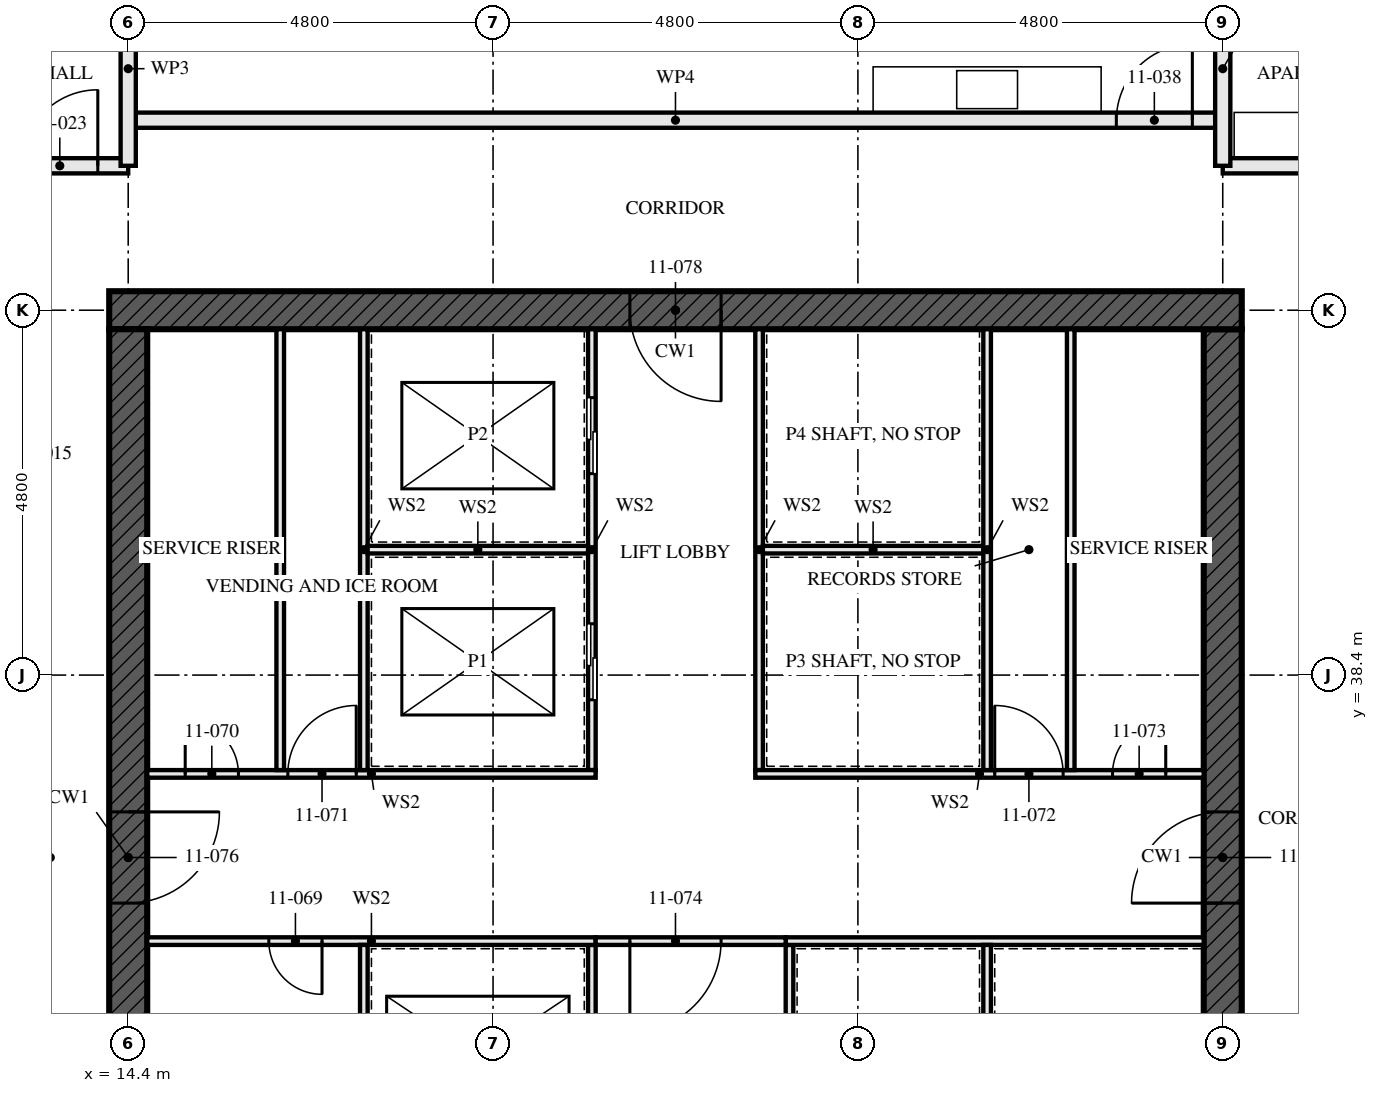
"""IFC4 building model, lengths in metres.
Left out: names, types, materials, properties, quantities, classifications, styles, units other than length and angle.
Written with IfcOpenShell. Run it as: python <this file> out.ifc"""

import sys

from ifc_helpers import new_model, si_unit, direction, frame, frame_2d, origin, place, context, subcontext, project, spatial, rectangle, extrude, element, fill, save


model = new_model("IFC4")
c1 = context("Model", 3, precision=1e-05, world=origin(), true_north=direction((0.0, 1.0)))
c2 = subcontext(c1, "Body", "Model", "MODEL_VIEW")
j1 = project(units=[si_unit("LENGTHUNIT", "METRE"), si_unit("PLANEANGLEUNIT", "RADIAN")], contexts=[c1])
p1 = place(None, origin())
s1 = spatial("IfcSite", under=j1, at=p1, CompositionType="ELEMENT")
p2 = place(p1, origin())
s2 = spatial("IfcBuilding", under=s1, at=p2, CompositionType="ELEMENT")
p3 = place(p2, frame((0.0, 0.0, 44.5)))
s3 = spatial("IfcBuildingStorey", under=s2, at=p3, CompositionType="ELEMENT", Elevation=44.5)
p4 = place(p3, frame((29.05, 43.2, -0.17), z_axis=(0.0, 0.0, 1.0), x_axis=(-1.0, 0.0, 0.0)))
e1 = element("IfcWall", 1, at=p4, inside=s3, PredefinedType="SHEAR", context=c2, shape_type="SweptSolid", body=[
    extrude(rectangle(XDim=14.9, YDim=0.5, at=frame_2d((7.45, 0.0))), origin(), (0.0, 0.0, 1.0), 3.5),
])
p5 = place(p4, frame((6.85, 0.0, 0.17)))
e2 = element("IfcOpeningElement", 2, at=p5, cuts=e1, PredefinedType="OPENING", context=c2, shape_type="SweptSolid", body=[
    extrude(rectangle(XDim=1.2, YDim=2.1, at=frame_2d((0.6, 1.05))), frame((0.0, 0.26, 0.0), z_axis=(0.0, -1.0, 0.0), x_axis=(1.0, 0.0, 0.0)), (0.0, 0.0, 1.0), 0.521),
])
p6 = place(p3, frame((14.4, 42.95, -0.17), z_axis=(0.0, 0.0, 1.0), x_axis=(0.0, -1.0, 0.0)))
e3 = element("IfcWall", 3, at=p6, inside=s3, PredefinedType="SHEAR", context=c2, shape_type="SweptSolid", body=[
    extrude(rectangle(XDim=13.9, YDim=0.5, at=frame_2d((6.95, 0.0))), origin(), (0.0, 0.0, 1.0), 3.5),
])
p7 = place(p6, frame((6.35, 0.0, 0.17)))
e4 = element("IfcOpeningElement", 4, at=p7, cuts=e3, PredefinedType="OPENING", context=c2, shape_type="SweptSolid", body=[
    extrude(rectangle(XDim=1.2, YDim=2.1, at=frame_2d((0.6, 1.05))), frame((0.0, 0.26, 0.0), z_axis=(0.0, -1.0, 0.0), x_axis=(1.0, 0.0, 0.0)), (0.0, 0.0, 1.0), 0.521),
])
p8 = place(p3, frame((28.8, 29.05, -0.17), z_axis=(0.0, 0.0, 1.0), x_axis=(0.0, 1.0, 0.0)))
e5 = element("IfcWall", 5, at=p8, inside=s3, PredefinedType="SHEAR", context=c2, shape_type="SweptSolid", body=[
    extrude(rectangle(XDim=13.9, YDim=0.5, at=frame_2d((6.95, 0.0))), origin(), (0.0, 0.0, 1.0), 3.5),
])
p9 = place(p8, frame((6.35, 0.0, 0.17)))
e6 = element("IfcOpeningElement", 6, at=p9, cuts=e5, PredefinedType="OPENING", context=c2, shape_type="SweptSolid", body=[
    extrude(rectangle(XDim=1.2, YDim=2.1, at=frame_2d((0.6, 1.05))), frame((0.0, 0.26, 0.0), z_axis=(0.0, -1.0, 0.0), x_axis=(1.0, 0.0, 0.0)), (0.0, 0.0, 1.0), 0.521),
])
p10 = place(p3, frame((14.4, 45.1, 0.0), z_axis=(0.0, 0.0, 1.0), x_axis=(-1.0, 0.0, 0.0)))
e7 = element("IfcWall", 7, at=p10, inside=s3, PredefinedType="PARTITIONING", context=c2, shape_type="SweptSolid", body=[
    extrude(rectangle(XDim=9.6, YDim=0.2, at=frame_2d((4.8, 0.0))), origin(), (0.0, 0.0, 1.0), 3.33),
])
p11 = place(p10, frame((0.4, 0.0, 0.0)))
e8 = element("IfcOpeningElement", 8, at=p11, cuts=e7, PredefinedType="OPENING", context=c2, shape_type="SweptSolid", body=[
    extrude(rectangle(XDim=1.0, YDim=2.1, at=frame_2d((0.5, 1.05))), frame((0.0, 0.111, 0.0), z_axis=(0.0, -1.0, 0.0), x_axis=(1.0, 0.0, 0.0)), (0.0, 0.0, 1.0), 0.221),
])
p12 = place(p3, frame((28.8, 45.7, 0.0), z_axis=(0.0, 0.0, 1.0), x_axis=(-1.0, 0.0, 0.0)))
e9 = element("IfcWall", 9, at=p12, inside=s3, PredefinedType="PARTITIONING", context=c2, shape_type="SweptSolid", body=[
    extrude(rectangle(XDim=14.4, YDim=0.2, at=frame_2d((7.2, 0.0))), origin(), (0.0, 0.0, 1.0), 3.33),
])
p13 = place(p12, frame((0.4, 0.0, 0.0)))
e10 = element("IfcOpeningElement", 10, at=p13, cuts=e9, PredefinedType="OPENING", context=c2, shape_type="SweptSolid", body=[
    extrude(rectangle(XDim=1.0, YDim=2.1, at=frame_2d((0.5, 1.05))), frame((0.0, 0.111, 0.0), z_axis=(0.0, -1.0, 0.0), x_axis=(1.0, 0.0, 0.0)), (0.0, 0.0, 1.0), 0.221),
])
p14 = place(p3, frame((38.4, 45.1, 0.0), z_axis=(0.0, 0.0, 1.0), x_axis=(-1.0, 0.0, 0.0)))
e11 = element("IfcWall", 11, at=p14, inside=s3, PredefinedType="PARTITIONING", context=c2, shape_type="SweptSolid", body=[
    extrude(rectangle(XDim=9.6, YDim=0.2, at=frame_2d((4.8, 0.0))), origin(), (0.0, 0.0, 1.0), 3.33),
])
p15 = place(p14, frame((0.4, 0.0, 0.0)))
e12 = element("IfcOpeningElement", 12, at=p15, cuts=e11, PredefinedType="OPENING", context=c2, shape_type="SweptSolid", body=[
    extrude(rectangle(XDim=1.0, YDim=2.1, at=frame_2d((0.5, 1.05))), frame((0.0, 0.111, 0.0), z_axis=(0.0, -1.0, 0.0), x_axis=(1.0, 0.0, 0.0)), (0.0, 0.0, 1.0), 0.221),
])
p16 = place(p14, frame((5.2, 0.0, 0.0)))
e13 = element("IfcOpeningElement", 13, at=p16, cuts=e11, PredefinedType="OPENING", context=c2, shape_type="SweptSolid", body=[
    extrude(rectangle(XDim=1.0, YDim=2.1, at=frame_2d((0.5, 1.05))), frame((0.0, 0.111, 0.0), z_axis=(0.0, -1.0, 0.0), x_axis=(1.0, 0.0, 0.0)), (0.0, 0.0, 1.0), 0.221),
])
for number, where, z_axis, x_axis in (
    (14, (16.4, 37.15, 0.0), (0.0, 0.0, 1.0), (0.0, 1.0, 0.0)),
    (15, (26.8, 37.15, 0.0), (0.0, 0.0, 1.0), (0.0, 1.0, 0.0)),
):
    element("IfcWall", number, at=place(p3, frame(where, z_axis=z_axis, x_axis=x_axis)), inside=s3, PredefinedType="SOLIDWALL", context=c2, shape_type="SweptSolid", body=[
        extrude(rectangle(XDim=5.8, YDim=0.1, at=frame_2d((2.9, 0.0))), origin(), (0.0, 0.0, 1.0), 3.33),
    ])
p17 = place(p3, frame((20.5, 29.05, 0.0), z_axis=(0.0, 0.0, 1.0), x_axis=(0.0, 1.0, 0.0)))
e16 = element("IfcWall", 16, at=p17, inside=s3, PredefinedType="SOLIDWALL", context=c2, shape_type="SweptSolid", body=[
    extrude(rectangle(XDim=5.8, YDim=0.1, at=frame_2d((2.9, 0.0))), origin(), (0.0, 0.0, 1.0), 3.33),
])
p18 = place(p17, frame((0.8, 0.0, 0.0)))
e17 = element("IfcOpeningElement", 17, at=p18, cuts=e16, PredefinedType="OPENING", context=c2, shape_type="SweptSolid", body=[
    extrude(rectangle(XDim=1.1, YDim=2.3, at=frame_2d((0.55, 1.15))), frame((0.0, 0.061, 0.0), z_axis=(0.0, -1.0, 0.0), x_axis=(1.0, 0.0, 0.0)), (0.0, 0.0, 1.0), 0.121),
])
p19 = place(p17, frame((3.775, 0.0, 0.0)))
e18 = element("IfcOpeningElement", 18, at=p19, cuts=e16, PredefinedType="OPENING", context=c2, shape_type="SweptSolid", body=[
    extrude(rectangle(XDim=1.1, YDim=2.3, at=frame_2d((0.55, 1.15))), frame((0.0, 0.061, 0.0), z_axis=(0.0, -1.0, 0.0), x_axis=(1.0, 0.0, 0.0)), (0.0, 0.0, 1.0), 0.121),
])
p20 = place(p3, frame((20.5, 37.15, 0.0), z_axis=(0.0, 0.0, 1.0), x_axis=(0.0, 1.0, 0.0)))
e19 = element("IfcWall", 19, at=p20, inside=s3, PredefinedType="SOLIDWALL", context=c2, shape_type="SweptSolid", body=[
    extrude(rectangle(XDim=5.8, YDim=0.1, at=frame_2d((2.9, 0.0))), origin(), (0.0, 0.0, 1.0), 3.33),
])
p21 = place(p20, frame((0.925, 0.0, 0.0)))
e20 = element("IfcOpeningElement", 20, at=p21, cuts=e19, PredefinedType="OPENING", context=c2, shape_type="SweptSolid", body=[
    extrude(rectangle(XDim=1.0, YDim=2.1, at=frame_2d((0.5, 1.05))), frame((0.0, 0.061, 0.0), z_axis=(0.0, -1.0, 0.0), x_axis=(1.0, 0.0, 0.0)), (0.0, 0.0, 1.0), 0.121),
])
p22 = place(p20, frame((3.9, 0.0, 0.0)))
e21 = element("IfcOpeningElement", 21, at=p22, cuts=e19, PredefinedType="OPENING", context=c2, shape_type="SweptSolid", body=[
    extrude(rectangle(XDim=1.0, YDim=2.1, at=frame_2d((0.5, 1.05))), frame((0.0, 0.061, 0.0), z_axis=(0.0, -1.0, 0.0), x_axis=(1.0, 0.0, 0.0)), (0.0, 0.0, 1.0), 0.121),
])
p23 = place(p3, frame((22.7, 37.15, 0.0), z_axis=(0.0, 0.0, 1.0), x_axis=(0.0, 1.0, 0.0)))
e22 = element("IfcWall", 22, at=p23, inside=s3, PredefinedType="SOLIDWALL", context=c2, shape_type="SweptSolid", body=[
    extrude(rectangle(XDim=5.8, YDim=0.1, at=frame_2d((2.9, 0.0))), origin(), (0.0, 0.0, 1.0), 3.33),
])
p24 = place(p3, frame((23.1, 29.05, 0.0), z_axis=(0.0, 0.0, 1.0), x_axis=(0.0, 1.0, 0.0)))
e23 = element("IfcWall", 23, at=p24, inside=s3, PredefinedType="SOLIDWALL", context=c2, shape_type="SweptSolid", body=[
    extrude(rectangle(XDim=5.8, YDim=0.1, at=frame_2d((2.9, 0.0))), origin(), (0.0, 0.0, 1.0), 3.33),
])
p25 = place(p24, frame((1.0, 0.0, 0.0)))
e24 = element("IfcOpeningElement", 24, at=p25, cuts=e23, PredefinedType="OPENING", context=c2, shape_type="SweptSolid", body=[
    extrude(rectangle(XDim=0.7, YDim=2.1, at=frame_2d((0.35, 1.05))), frame((0.0, 0.061, 0.0), z_axis=(0.0, -1.0, 0.0), x_axis=(1.0, 0.0, 0.0)), (0.0, 0.0, 1.0), 0.121),
])
p26 = place(p3, frame((14.65, 34.9, 0.0), z_axis=(0.0, 0.0, 1.0), x_axis=(1.0, 0.0, 0.0)))
e25 = element("IfcWall", 25, at=p26, inside=s3, PredefinedType="SOLIDWALL", context=c2, shape_type="SweptSolid", body=[
    extrude(rectangle(XDim=5.9, YDim=0.1, at=frame_2d((2.95, 0.0))), origin(), (0.0, 0.0, 1.0), 3.33),
])
p27 = place(p26, frame((1.6, 0.0, 0.0)))
e26 = element("IfcOpeningElement", 26, at=p27, cuts=e25, PredefinedType="OPENING", context=c2, shape_type="SweptSolid", body=[
    extrude(rectangle(XDim=0.7, YDim=2.1, at=frame_2d((0.35, 1.05))), frame((0.0, 0.061, 0.0), z_axis=(0.0, -1.0, 0.0), x_axis=(1.0, 0.0, 0.0)), (0.0, 0.0, 1.0), 0.121),
])
p28 = place(p3, frame((23.05, 34.9, 0.0), z_axis=(0.0, 0.0, 1.0), x_axis=(1.0, 0.0, 0.0)))
e27 = element("IfcWall", 27, at=p28, inside=s3, PredefinedType="SOLIDWALL", context=c2, shape_type="SweptSolid", body=[
    extrude(rectangle(XDim=5.5, YDim=0.1, at=frame_2d((2.75, 0.0))), origin(), (0.0, 0.0, 1.0), 3.33),
])
p29 = place(p3, frame((14.65, 37.1, 0.0), z_axis=(0.0, 0.0, 1.0), x_axis=(1.0, 0.0, 0.0)))
e28 = element("IfcWall", 28, at=p29, inside=s3, PredefinedType="SOLIDWALL", context=c2, shape_type="SweptSolid", body=[
    extrude(rectangle(XDim=5.9, YDim=0.1, at=frame_2d((2.95, 0.0))), origin(), (0.0, 0.0, 1.0), 3.33),
])
p30 = place(p29, frame((0.5, 0.0, 0.0)))
e29 = element("IfcOpeningElement", 29, at=p30, cuts=e28, PredefinedType="OPENING", context=c2, shape_type="SweptSolid", body=[
    extrude(rectangle(XDim=0.7, YDim=2.1, at=frame_2d((0.35, 1.05))), frame((0.0, 0.061, 0.0), z_axis=(0.0, -1.0, 0.0), x_axis=(1.0, 0.0, 0.0)), (0.0, 0.0, 1.0), 0.121),
])
p31 = place(p29, frame((1.85, 0.0, 0.0)))
e30 = element("IfcOpeningElement", 30, at=p31, cuts=e28, PredefinedType="OPENING", context=c2, shape_type="SweptSolid", body=[
    extrude(rectangle(XDim=0.9, YDim=2.1, at=frame_2d((0.45, 1.05))), frame((0.0, 0.061, 0.0), z_axis=(0.0, -1.0, 0.0), x_axis=(1.0, 0.0, 0.0)), (0.0, 0.0, 1.0), 0.121),
])
p32 = place(p3, frame((22.65, 37.1, 0.0), z_axis=(0.0, 0.0, 1.0), x_axis=(1.0, 0.0, 0.0)))
e31 = element("IfcWall", 31, at=p32, inside=s3, PredefinedType="SOLIDWALL", context=c2, shape_type="SweptSolid", body=[
    extrude(rectangle(XDim=5.9, YDim=0.1, at=frame_2d((2.95, 0.0))), origin(), (0.0, 0.0, 1.0), 3.33),
])
p33 = place(p32, frame((3.15, 0.0, 0.0)))
e32 = element("IfcOpeningElement", 32, at=p33, cuts=e31, PredefinedType="OPENING", context=c2, shape_type="SweptSolid", body=[
    extrude(rectangle(XDim=0.9, YDim=2.1, at=frame_2d((0.45, 1.05))), frame((0.0, 0.061, 0.0), z_axis=(0.0, -1.0, 0.0), x_axis=(1.0, 0.0, 0.0)), (0.0, 0.0, 1.0), 0.121),
])
p34 = place(p32, frame((4.7, 0.0, 0.0)))
e33 = element("IfcOpeningElement", 33, at=p34, cuts=e31, PredefinedType="OPENING", context=c2, shape_type="SweptSolid", body=[
    extrude(rectangle(XDim=0.7, YDim=2.1, at=frame_2d((0.35, 1.05))), frame((0.0, 0.061, 0.0), z_axis=(0.0, -1.0, 0.0), x_axis=(1.0, 0.0, 0.0)), (0.0, 0.0, 1.0), 0.121),
])
p35 = place(p3, frame((20.55, 34.9, 0.0), z_axis=(0.0, 0.0, 1.0), x_axis=(1.0, 0.0, 0.0)))
e34 = element("IfcWall", 34, at=p35, inside=s3, PredefinedType="SOLIDWALL", context=c2, shape_type="SweptSolid", body=[
    extrude(rectangle(XDim=2.5, YDim=0.1, at=frame_2d((1.25, 0.0))), origin(), (0.0, 0.0, 1.0), 3.33),
])
p36 = place(p35, frame((0.45, 0.0, 0.0)))
e35 = element("IfcOpeningElement", 35, at=p36, cuts=e34, PredefinedType="OPENING", context=c2, shape_type="SweptSolid", body=[
    extrude(rectangle(XDim=1.2, YDim=2.1, at=frame_2d((0.6, 1.05))), frame((0.0, 0.061, 0.0), z_axis=(0.0, -1.0, 0.0), x_axis=(1.0, 0.0, 0.0)), (0.0, 0.0, 1.0), 0.121),
])
for number, where, z_axis, x_axis in (
    (36, (17.5, 29.05, 0.0), (0.0, 0.0, 1.0), (0.0, 1.0, 0.0)),
    (37, (17.5, 37.15, 0.0), (0.0, 0.0, 1.0), (0.0, 1.0, 0.0)),
):
    element("IfcWall", number, at=place(p3, frame(where, z_axis=z_axis, x_axis=x_axis)), inside=s3, PredefinedType="SOLIDWALL", context=c2, shape_type="SweptSolid", body=[
        extrude(rectangle(XDim=5.8, YDim=0.1, at=frame_2d((2.9, 0.0))), origin(), (0.0, 0.0, 1.0), 3.33),
    ])
for number, where, z_axis, x_axis in (
    (38, (17.55, 40.05, 0.0), (0.0, 0.0, 1.0), (1.0, 0.0, 0.0)),
    (39, (22.75, 40.05, 0.0), (0.0, 0.0, 1.0), (1.0, 0.0, 0.0)),
):
    element("IfcWall", number, at=place(p3, frame(where, z_axis=z_axis, x_axis=x_axis)), inside=s3, PredefinedType="SOLIDWALL", context=c2, shape_type="SweptSolid", body=[
        extrude(rectangle(XDim=2.9, YDim=0.1, at=frame_2d((1.45, 0.0))), origin(), (0.0, 0.0, 1.0), 3.33),
    ])
p37 = place(p3, frame((25.7, 37.15, 0.0), z_axis=(0.0, 0.0, 1.0), x_axis=(0.0, 1.0, 0.0)))
e40 = element("IfcWall", 40, at=p37, inside=s3, PredefinedType="SOLIDWALL", context=c2, shape_type="SweptSolid", body=[
    extrude(rectangle(XDim=5.8, YDim=0.1, at=frame_2d((2.9, 0.0))), origin(), (0.0, 0.0, 1.0), 3.33),
])
p38 = place(p3, frame((25.7, 31.95, 0.0), z_axis=(0.0, 0.0, 1.0), x_axis=(0.0, 1.0, 0.0)))
e41 = element("IfcWall", 41, at=p38, inside=s3, PredefinedType="SOLIDWALL", context=c2, shape_type="SweptSolid", body=[
    extrude(rectangle(XDim=2.9, YDim=0.1, at=frame_2d((1.45, 0.0))), origin(), (0.0, 0.0, 1.0), 3.33),
])
for number, where, z_axis, x_axis in (
    (42, (14.4, 45.1, 0.0), (0.0, 0.0, 1.0), (0.0, 1.0, 0.0)),
    (43, (28.8, 45.1, 0.0), (0.0, 0.0, 1.0), (0.0, 1.0, 0.0)),
):
    element("IfcWall", number, at=place(p3, frame(where, z_axis=z_axis, x_axis=x_axis)), inside=s3, PredefinedType="PARTITIONING", context=c2, shape_type="SweptSolid", body=[
        extrude(rectangle(XDim=2.555, YDim=0.2, at=frame_2d((1.277, 0.0))), origin(), (0.0, 0.0, 1.0), 2.32),
    ])
p39 = place(p11, frame((1.0, 0.0, 0.0), z_axis=(0.0, 0.0, 1.0), x_axis=(-1.0, 0.0, 0.0)))
e44 = element("IfcDoor", 44, at=p39, inside=s3, OperationType="SINGLE_SWING_LEFT", PredefinedType="DOOR", context=c2, shape_type="SweptSolid", body=[
    extrude(rectangle(XDim=1.0, YDim=2.1, at=frame_2d((0.5, 1.05))), frame((0.0, 0.027, 0.0), z_axis=(0.0, -1.0, 0.0), x_axis=(1.0, 0.0, 0.0)), (0.0, 0.0, 1.0), 0.054),
])
fill(e8, e44)
p40 = place(p13, frame((1.0, 0.0, 0.0), z_axis=(0.0, 0.0, 1.0), x_axis=(-1.0, 0.0, 0.0)))
e45 = element("IfcDoor", 45, at=p40, inside=s3, OperationType="SINGLE_SWING_LEFT", PredefinedType="DOOR", context=c2, shape_type="SweptSolid", body=[
    extrude(rectangle(XDim=1.0, YDim=2.1, at=frame_2d((0.5, 1.05))), frame((0.0, 0.027, 0.0), z_axis=(0.0, -1.0, 0.0), x_axis=(1.0, 0.0, 0.0)), (0.0, 0.0, 1.0), 0.054),
])
fill(e10, e45)
p41 = place(p21, origin())
e46 = element("IfcDoor", 46, at=p41, inside=s3, OperationType="SLIDING_TO_LEFT", PredefinedType="DOOR", context=c2, shape_type="SweptSolid", body=[
    extrude(rectangle(XDim=1.0, YDim=2.1, at=frame_2d((0.5, 1.05))), frame((0.0, 0.05, 0.0), z_axis=(0.0, -1.0, 0.0), x_axis=(1.0, 0.0, 0.0)), (0.0, 0.0, 1.0), 0.1),
])
fill(e20, e46)
p42 = place(p22, origin())
e47 = element("IfcDoor", 47, at=p42, inside=s3, OperationType="SLIDING_TO_LEFT", PredefinedType="DOOR", context=c2, shape_type="SweptSolid", body=[
    extrude(rectangle(XDim=1.0, YDim=2.1, at=frame_2d((0.5, 1.05))), frame((0.0, 0.05, 0.0), z_axis=(0.0, -1.0, 0.0), x_axis=(1.0, 0.0, 0.0)), (0.0, 0.0, 1.0), 0.1),
])
fill(e21, e47)
p43 = place(p27, frame((0.7, 0.0, 0.0), z_axis=(0.0, 0.0, 1.0), x_axis=(-1.0, 0.0, 0.0)))
e48 = element("IfcDoor", 48, at=p43, inside=s3, OperationType="SINGLE_SWING_RIGHT", PredefinedType="DOOR", context=c2, shape_type="SweptSolid", body=[
    extrude(rectangle(XDim=0.7, YDim=2.1, at=frame_2d((0.35, 1.05))), frame((0.0, 0.027, 0.0), z_axis=(0.0, -1.0, 0.0), x_axis=(1.0, 0.0, 0.0)), (0.0, 0.0, 1.0), 0.054),
])
fill(e26, e48)
p44 = place(p30, origin())
e49 = element("IfcDoor", 49, at=p44, inside=s3, OperationType="SINGLE_SWING_RIGHT", PredefinedType="DOOR", context=c2, shape_type="SweptSolid", body=[
    extrude(rectangle(XDim=0.7, YDim=2.1, at=frame_2d((0.35, 1.05))), frame((0.0, 0.027, 0.0), z_axis=(0.0, -1.0, 0.0), x_axis=(1.0, 0.0, 0.0)), (0.0, 0.0, 1.0), 0.054),
])
fill(e29, e49)
p45 = place(p31, origin())
e50 = element("IfcDoor", 50, at=p45, inside=s3, OperationType="SINGLE_SWING_LEFT", PredefinedType="DOOR", context=c2, shape_type="SweptSolid", body=[
    extrude(rectangle(XDim=0.9, YDim=2.1, at=frame_2d((0.45, 1.05))), frame((0.0, 0.027, 0.0), z_axis=(0.0, -1.0, 0.0), x_axis=(1.0, 0.0, 0.0)), (0.0, 0.0, 1.0), 0.054),
])
fill(e30, e50)
p46 = place(p33, origin())
e51 = element("IfcDoor", 51, at=p46, inside=s3, OperationType="SINGLE_SWING_RIGHT", PredefinedType="DOOR", context=c2, shape_type="SweptSolid", body=[
    extrude(rectangle(XDim=0.9, YDim=2.1, at=frame_2d((0.45, 1.05))), frame((0.0, 0.027, 0.0), z_axis=(0.0, -1.0, 0.0), x_axis=(1.0, 0.0, 0.0)), (0.0, 0.0, 1.0), 0.054),
])
fill(e32, e51)
p47 = place(p34, origin())
e52 = element("IfcDoor", 52, at=p47, inside=s3, OperationType="SINGLE_SWING_LEFT", PredefinedType="DOOR", context=c2, shape_type="SweptSolid", body=[
    extrude(rectangle(XDim=0.7, YDim=2.1, at=frame_2d((0.35, 1.05))), frame((0.0, 0.027, 0.0), z_axis=(0.0, -1.0, 0.0), x_axis=(1.0, 0.0, 0.0)), (0.0, 0.0, 1.0), 0.054),
])
fill(e33, e52)
p48 = place(p36, frame((1.2, 0.0, 0.0), z_axis=(0.0, 0.0, 1.0), x_axis=(-1.0, 0.0, 0.0)))
e53 = element("IfcDoor", 53, at=p48, inside=s3, OperationType="SINGLE_SWING_LEFT", PredefinedType="DOOR", context=c2, shape_type="SweptSolid", body=[
    extrude(rectangle(XDim=1.2, YDim=2.1, at=frame_2d((0.6, 1.05))), frame((0.0, 0.027, 0.0), z_axis=(0.0, -1.0, 0.0), x_axis=(1.0, 0.0, 0.0)), (0.0, 0.0, 1.0), 0.054),
])
fill(e35, e53)
p49 = place(p7, origin())
e54 = element("IfcDoor", 54, at=p49, inside=s3, OperationType="SINGLE_SWING_LEFT", PredefinedType="DOOR", context=c2, shape_type="SweptSolid", body=[
    extrude(rectangle(XDim=1.2, YDim=2.1, at=frame_2d((0.6, 1.05))), frame((0.0, 0.027, 0.0), z_axis=(0.0, -1.0, 0.0), x_axis=(1.0, 0.0, 0.0)), (0.0, 0.0, 1.0), 0.054),
])
fill(e4, e54)
p50 = place(p9, origin())
e55 = element("IfcDoor", 55, at=p50, inside=s3, OperationType="SINGLE_SWING_LEFT", PredefinedType="DOOR", context=c2, shape_type="SweptSolid", body=[
    extrude(rectangle(XDim=1.2, YDim=2.1, at=frame_2d((0.6, 1.05))), frame((0.0, 0.027, 0.0), z_axis=(0.0, -1.0, 0.0), x_axis=(1.0, 0.0, 0.0)), (0.0, 0.0, 1.0), 0.054),
])
fill(e6, e55)
p51 = place(p5, origin())
e56 = element("IfcDoor", 56, at=p51, inside=s3, OperationType="SINGLE_SWING_LEFT", PredefinedType="DOOR", context=c2, shape_type="SweptSolid", body=[
    extrude(rectangle(XDim=1.2, YDim=2.1, at=frame_2d((0.6, 1.05))), frame((0.0, 0.027, 0.0), z_axis=(0.0, -1.0, 0.0), x_axis=(1.0, 0.0, 0.0)), (0.0, 0.0, 1.0), 0.054),
])
fill(e2, e56)
save(model, sys.argv[1])
